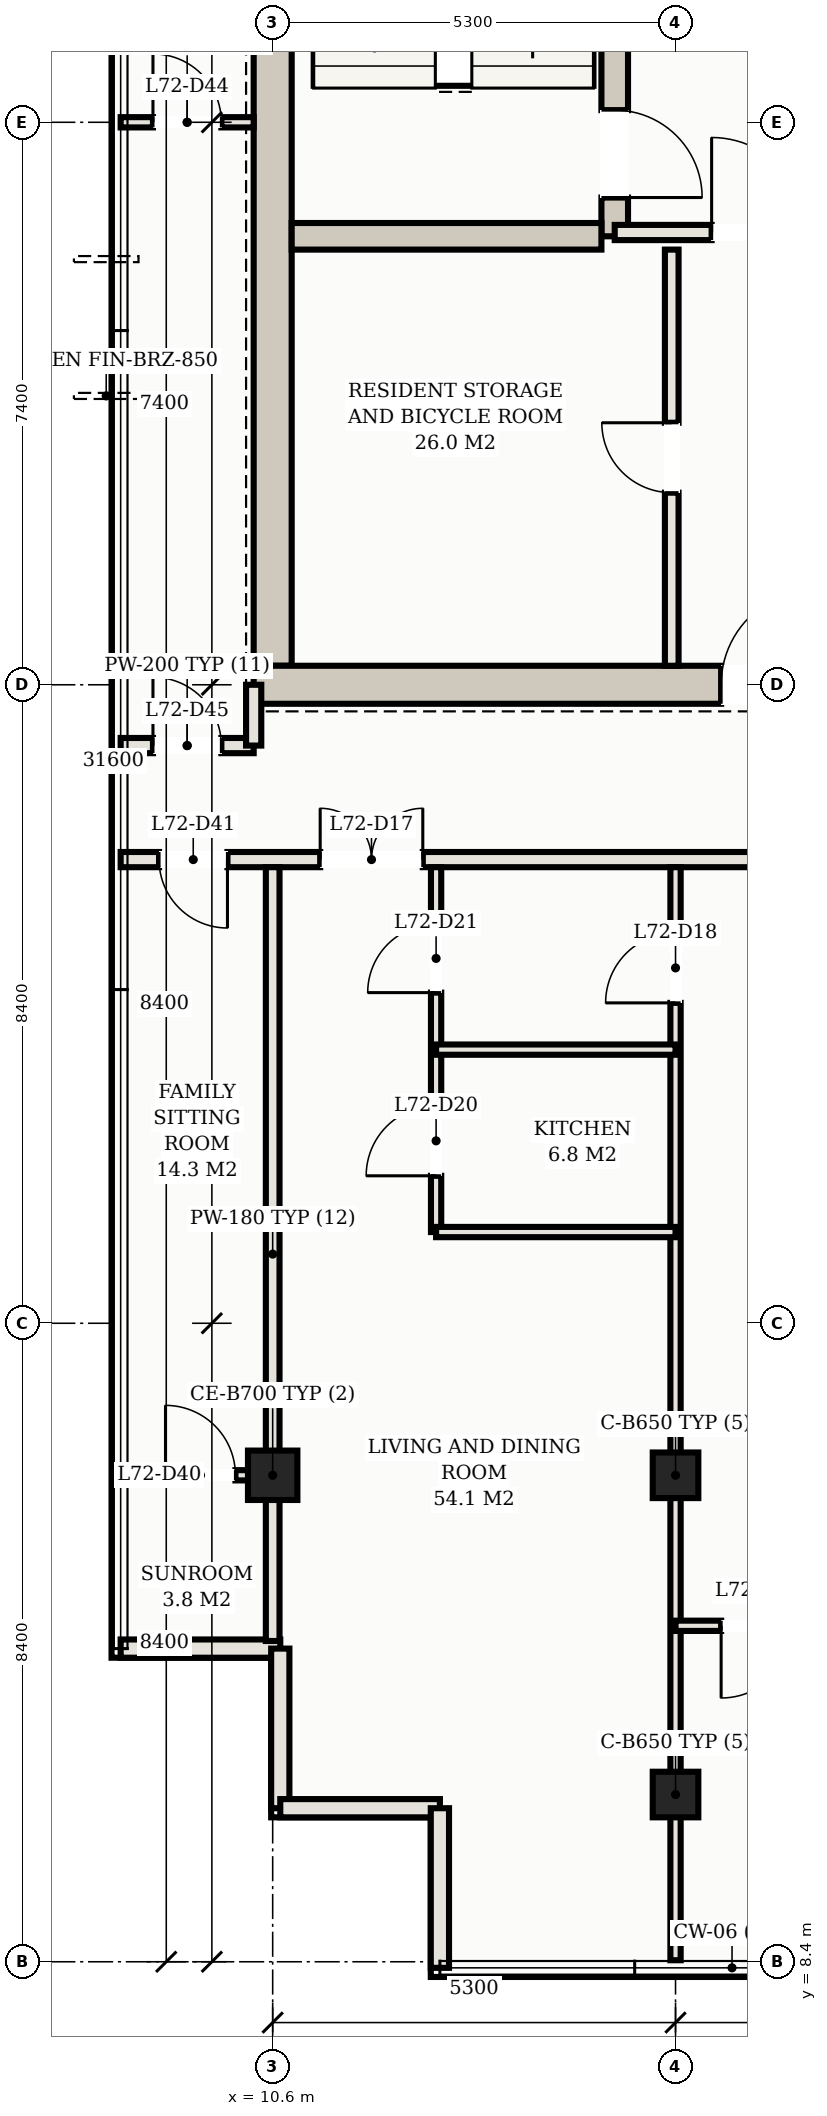
"""IFC4 building model, lengths in metres.
Left out: names, types, materials, properties, quantities, classifications, styles, units other than length and angle.
Written with IfcOpenShell. Run it as: python <this file> out.ifc"""

import sys

from ifc_helpers import new_model, si_unit, direction, frame, frame_2d, origin, origin_2d, place, context, subcontext, project, spatial, rectangle, hollow_rectangle, extrude, element, fill, save


model = new_model("IFC4")
c1 = context("Model", 3, precision=1e-05, world=origin(), true_north=direction((0.0, 1.0)))
c2 = subcontext(c1, "Body", "Model", "MODEL_VIEW")
j1 = project(units=[si_unit("LENGTHUNIT", "METRE"), si_unit("PLANEANGLEUNIT", "RADIAN")], contexts=[c1])
p1 = place(None, origin())
s1 = spatial("IfcSite", under=j1, at=p1, CompositionType="ELEMENT")
p2 = place(p1, origin())
s2 = spatial("IfcBuilding", under=s1, at=p2, CompositionType="ELEMENT")
p3 = place(p2, frame((0.0, 0.0, 259.4)))
s3 = spatial("IfcBuildingStorey", under=s2, at=p3, CompositionType="ELEMENT", Elevation=259.4)
p4 = place(p3, frame((10.6, 25.45, 0.0), z_axis=(0.0, 0.0, 1.0), x_axis=(0.0, 1.0, 0.0)))
e1 = element("IfcWall", 1, at=p4, inside=s3, PredefinedType="SHEAR", context=c2, shape_type="SweptSolid", body=[
    extrude(rectangle(XDim=14.3, YDim=0.5, at=frame_2d((7.15, 0.0))), origin(), (0.0, 0.0, 1.0), 3.11),
])
p5 = place(p3, frame((10.35, 25.2, 0.0), z_axis=(0.0, 0.0, 1.0), x_axis=(1.0, 0.0, 0.0)))
e2 = element("IfcWall", 2, at=p5, inside=s3, PredefinedType="SHEAR", context=c2, shape_type="SweptSolid", body=[
    extrude(rectangle(XDim=8.05, YDim=0.5, at=frame_2d((4.025, 0.0))), origin(), (0.0, 0.0, 1.0), 3.11),
])
p6 = place(p5, frame((6.15, 0.0, 0.0)))
e3 = element("IfcOpeningElement", 3, at=p6, cuts=e2, PredefinedType="OPENING", context=c2, shape_type="SweptSolid", body=[
    extrude(rectangle(XDim=1.25, YDim=2.2, at=frame_2d((0.625, 1.1))), frame((0.0, 0.26, 0.0), z_axis=(0.0, -1.0, 0.0), x_axis=(1.0, 0.0, 0.0)), (0.0, 0.0, 1.0), 0.52),
])
p7 = place(p3, frame((15.1, 31.1, 0.0), z_axis=(0.0, 0.0, 1.0), x_axis=(0.0, 1.0, 0.0)))
e4 = element("IfcWall", 4, at=p7, inside=s3, PredefinedType="SHEAR", context=c2, shape_type="SweptSolid", body=[
    extrude(rectangle(XDim=8.65, YDim=0.35, at=frame_2d((4.325, 0.0))), origin(), (0.0, 0.0, 1.0), 3.11),
])
p8 = place(p7, frame((0.51, 0.0, 0.0)))
e5 = element("IfcOpeningElement", 5, at=p8, cuts=e4, PredefinedType="OPENING", context=c2, shape_type="SweptSolid", body=[
    extrude(rectangle(XDim=1.15, YDim=2.2, at=frame_2d((0.575, 1.1))), frame((0.0, 0.185, 0.0), z_axis=(0.0, -1.0, 0.0), x_axis=(1.0, 0.0, 0.0)), (0.0, 0.0, 1.0), 0.37),
])
p9 = place(p3, frame((10.85, 31.1, 0.0), z_axis=(0.0, 0.0, 1.0), x_axis=(1.0, 0.0, 0.0)))
e6 = element("IfcWall", 6, at=p9, inside=s3, PredefinedType="SHEAR", context=c2, shape_type="SweptSolid", body=[
    extrude(rectangle(XDim=4.075, YDim=0.35, at=frame_2d((2.038, 0.0))), origin(), (0.0, 0.0, 1.0), 3.11),
])
for number, where, z_axis, x_axis in (
    (7, (15.9, 14.8, 0.0), (0.0, 0.0, 1.0), (1.0, 0.0, 0.0)),
    (8, (15.9, 10.6, 0.0), (0.0, 0.0, 1.0), (1.0, 0.0, 0.0)),
):
    element("IfcColumn", number, at=place(p3, frame(where, z_axis=z_axis, x_axis=x_axis)), inside=s3, PredefinedType="COLUMN", context=c2, shape_type="SweptSolid", body=[
        extrude(hollow_rectangle(XDim=0.6, YDim=0.6, WallThickness=0.022, at=origin_2d()), origin(), (0.0, 0.0, 1.0), 3.3),
    ])
p10 = place(p3, frame((10.6, 14.8, 0.0), z_axis=(0.0, 0.0, 1.0), x_axis=(1.0, 0.0, 0.0)))
e9 = element("IfcColumn", 9, at=p10, inside=s3, PredefinedType="COLUMN", context=c2, shape_type="SweptSolid", body=[
    extrude(hollow_rectangle(XDim=0.65, YDim=0.65, WallThickness=0.022, at=origin_2d()), origin(), (0.0, 0.0, 1.0), 3.3),
])
p11 = place(p3, frame((8.6, 12.52, 0.0), z_axis=(0.0, 0.0, 1.0), x_axis=(1.0, 0.0, 0.0)))
e10 = element("IfcWall", 10, at=p11, inside=s3, PredefinedType="SOLIDWALL", context=c2, shape_type="SweptSolid", body=[
    extrude(rectangle(XDim=2.1, YDim=0.24, at=frame_2d((1.05, 0.0))), origin(), (0.0, 0.0, 1.0), 3.11),
])
for number, where, z_axis, x_axis in (
    (11, (10.7, 12.52, 0.0), (0.0, 0.0, 1.0), (0.0, -1.0, 0.0)),
    (12, (10.7, 10.42, 0.0), (0.0, 0.0, 1.0), (1.0, 0.0, 0.0)),
):
    element("IfcWall", number, at=place(p3, frame(where, z_axis=z_axis, x_axis=x_axis)), inside=s3, PredefinedType="SOLIDWALL", context=c2, shape_type="SweptSolid", body=[
        extrude(rectangle(XDim=2.1, YDim=0.24, at=frame_2d((1.05, 0.0))), origin(), (0.0, 0.0, 1.0), 3.11),
    ])
p12 = place(p3, frame((12.8, 10.42, 0.0), z_axis=(0.0, 0.0, 1.0), x_axis=(0.0, -1.0, 0.0)))
e13 = element("IfcWall", 13, at=p12, inside=s3, PredefinedType="SOLIDWALL", context=c2, shape_type="SweptSolid", body=[
    extrude(rectangle(XDim=2.1, YDim=0.24, at=frame_2d((1.05, 0.0))), origin(), (0.0, 0.0, 1.0), 3.11),
])
p13 = place(p3, frame((15.1, 31.15, 0.0), z_axis=(0.0, 0.0, 1.0), x_axis=(1.0, 0.0, 0.0)))
e14 = element("IfcWall", 14, at=p13, inside=s3, PredefinedType="PARTITIONING", context=c2, shape_type="SweptSolid", body=[
    extrude(rectangle(XDim=3.25, YDim=0.2, at=frame_2d((1.625, 0.0))), origin(), (0.0, 0.0, 1.0), 2.45),
])
p14 = place(p13, frame((1.275, 0.0, 0.0)))
e15 = element("IfcOpeningElement", 15, at=p14, cuts=e14, PredefinedType="OPENING", context=c2, shape_type="SweptSolid", body=[
    extrude(rectangle(XDim=1.25, YDim=2.2, at=frame_2d((0.625, 1.1))), frame((0.0, 0.11, 0.0), z_axis=(0.0, -1.0, 0.0), x_axis=(1.0, 0.0, 0.0)), (0.0, 0.0, 1.0), 0.22),
])
p15 = place(p3, frame((15.85, 25.45, 0.0), z_axis=(0.0, 0.0, 1.0), x_axis=(0.0, 1.0, 0.0)))
e16 = element("IfcWall", 16, at=p15, inside=s3, PredefinedType="PARTITIONING", context=c2, shape_type="SweptSolid", body=[
    extrude(rectangle(XDim=5.475, YDim=0.18, at=frame_2d((2.738, 0.0))), origin(), (0.0, 0.0, 1.0), 2.45),
])
p16 = place(p15, frame((2.277, 0.0, 0.0)))
e17 = element("IfcOpeningElement", 17, at=p16, cuts=e16, PredefinedType="OPENING", context=c2, shape_type="SweptSolid", body=[
    extrude(rectangle(XDim=0.92, YDim=2.15, at=frame_2d((0.46, 1.075))), frame((0.0, 0.1, 0.0), z_axis=(0.0, -1.0, 0.0), x_axis=(1.0, 0.0, 0.0)), (0.0, 0.0, 1.0), 0.2),
])
p17 = place(p3, frame((8.6, 22.9, 0.0), z_axis=(0.0, 0.0, 1.0), x_axis=(1.0, 0.0, 0.0)))
e18 = element("IfcWall", 18, at=p17, inside=s3, PredefinedType="PARTITIONING", context=c2, shape_type="SweptSolid", body=[
    extrude(rectangle(XDim=35.8, YDim=0.2, at=frame_2d((17.9, 0.0))), origin(), (0.0, 0.0, 1.0), 2.45),
])
p18 = place(p17, frame((2.625, 0.0, 0.0)))
e19 = element("IfcOpeningElement", 19, at=p18, cuts=e18, PredefinedType="OPENING", context=c2, shape_type="SweptSolid", body=[
    extrude(rectangle(XDim=1.35, YDim=2.33, at=frame_2d((0.675, 1.165))), frame((0.0, 0.11, 0.0), z_axis=(0.0, -1.0, 0.0), x_axis=(1.0, 0.0, 0.0)), (0.0, 0.0, 1.0), 0.22),
])
p19 = place(p17, frame((18.65, 0.0, 0.0)))
e20 = element("IfcOpeningElement", 20, at=p19, cuts=e18, PredefinedType="OPENING", context=c2, shape_type="SweptSolid", body=[
    extrude(rectangle(XDim=1.1, YDim=2.25, at=frame_2d((0.55, 1.125))), frame((0.0, 0.11, 0.0), z_axis=(0.0, -1.0, 0.0), x_axis=(1.0, 0.0, 0.0)), (0.0, 0.0, 1.0), 0.22),
])
p20 = place(p17, frame((29.25, 0.0, 0.0)))
e21 = element("IfcOpeningElement", 21, at=p20, cuts=e18, PredefinedType="OPENING", context=c2, shape_type="SweptSolid", body=[
    extrude(rectangle(XDim=1.1, YDim=2.25, at=frame_2d((0.55, 1.125))), frame((0.0, 0.11, 0.0), z_axis=(0.0, -1.0, 0.0), x_axis=(1.0, 0.0, 0.0)), (0.0, 0.0, 1.0), 0.22),
])
p21 = place(p17, frame((0.505, 0.0, 0.0)))
e22 = element("IfcOpeningElement", 22, at=p21, cuts=e18, PredefinedType="OPENING", context=c2, shape_type="SweptSolid", body=[
    extrude(rectangle(XDim=0.9, YDim=2.15, at=frame_2d((0.45, 1.075))), frame((0.0, 0.11, 0.0), z_axis=(0.0, -1.0, 0.0), x_axis=(1.0, 0.0, 0.0)), (0.0, 0.0, 1.0), 0.22),
])
p22 = place(p17, frame((34.395, 0.0, 0.0)))
e23 = element("IfcOpeningElement", 23, at=p22, cuts=e18, PredefinedType="OPENING", context=c2, shape_type="SweptSolid", body=[
    extrude(rectangle(XDim=0.9, YDim=2.15, at=frame_2d((0.45, 1.075))), frame((0.0, 0.11, 0.0), z_axis=(0.0, -1.0, 0.0), x_axis=(1.0, 0.0, 0.0)), (0.0, 0.0, 1.0), 0.22),
])
p23 = place(p3, frame((8.6, 24.4, 0.0), z_axis=(0.0, 0.0, 1.0), x_axis=(1.0, 0.0, 0.0)))
e24 = element("IfcWall", 24, at=p23, inside=s3, PredefinedType="PARTITIONING", context=c2, shape_type="SweptSolid", body=[
    extrude(rectangle(XDim=1.75, YDim=0.2, at=frame_2d((0.875, 0.0))), origin(), (0.0, 0.0, 1.0), 2.45),
])
p24 = place(p23, frame((0.425, 0.0, 0.0)))
e25 = element("IfcOpeningElement", 25, at=p24, cuts=e24, PredefinedType="OPENING", context=c2, shape_type="SweptSolid", body=[
    extrude(rectangle(XDim=0.9, YDim=2.15, at=frame_2d((0.45, 1.075))), frame((0.0, 0.11, 0.0), z_axis=(0.0, -1.0, 0.0), x_axis=(1.0, 0.0, 0.0)), (0.0, 0.0, 1.0), 0.22),
])
p25 = place(p3, frame((10.35, 24.4, 0.0), z_axis=(0.0, 0.0, 1.0), x_axis=(0.0, 1.0, 0.0)))
e26 = element("IfcWall", 26, at=p25, inside=s3, PredefinedType="PARTITIONING", context=c2, shape_type="SweptSolid", body=[
    extrude(rectangle(XDim=0.8, YDim=0.2, at=frame_2d((0.4, 0.0))), origin(), (0.0, 0.0, 1.0), 2.45),
])
p26 = place(p3, frame((10.6, 12.62, 0.0), z_axis=(0.0, 0.0, 1.0), x_axis=(0.0, 1.0, 0.0)))
e27 = element("IfcWall", 27, at=p26, inside=s3, PredefinedType="PARTITIONING", context=c2, shape_type="SweptSolid", body=[
    extrude(rectangle(XDim=10.18, YDim=0.18, at=frame_2d((5.09, 0.0))), origin(), (0.0, 0.0, 1.0), 2.45),
])
p27 = place(p3, frame((15.9, 8.42, 0.0), z_axis=(0.0, 0.0, 1.0), x_axis=(0.0, 1.0, 0.0)))
e28 = element("IfcWall", 28, at=p27, inside=s3, PredefinedType="PARTITIONING", context=c2, shape_type="SweptSolid", body=[
    extrude(rectangle(XDim=14.38, YDim=0.135, at=frame_2d((7.19, 0.0))), origin(), (0.0, 0.0, 1.0), 2.45),
])
p28 = place(p27, frame((12.595, 0.0, 0.0)))
e29 = element("IfcOpeningElement", 29, at=p28, cuts=e28, PredefinedType="OPENING", context=c2, shape_type="SweptSolid", body=[
    extrude(rectangle(XDim=0.92, YDim=2.15, at=frame_2d((0.46, 1.075))), frame((0.0, 0.078, 0.0), z_axis=(0.0, -1.0, 0.0), x_axis=(1.0, 0.0, 0.0)), (0.0, 0.0, 1.0), 0.155),
])
p29 = place(p3, frame((12.75, 18.0, 0.0), z_axis=(0.0, 0.0, 1.0), x_axis=(0.0, 1.0, 0.0)))
e30 = element("IfcWall", 30, at=p29, inside=s3, PredefinedType="PARTITIONING", context=c2, shape_type="SweptSolid", body=[
    extrude(rectangle(XDim=4.8, YDim=0.135, at=frame_2d((2.4, 0.0))), origin(), (0.0, 0.0, 1.0), 2.45),
])
p30 = place(p29, frame((0.74, 0.0, 0.0)))
e31 = element("IfcOpeningElement", 31, at=p30, cuts=e30, PredefinedType="OPENING", context=c2, shape_type="SweptSolid", body=[
    extrude(rectangle(XDim=0.92, YDim=2.15, at=frame_2d((0.46, 1.075))), frame((0.0, 0.078, 0.0), z_axis=(0.0, -1.0, 0.0), x_axis=(1.0, 0.0, 0.0)), (0.0, 0.0, 1.0), 0.155),
])
p31 = place(p29, frame((3.15, 0.0, 0.0)))
e32 = element("IfcOpeningElement", 32, at=p31, cuts=e30, PredefinedType="OPENING", context=c2, shape_type="SweptSolid", body=[
    extrude(rectangle(XDim=0.9, YDim=2.15, at=frame_2d((0.45, 1.075))), frame((0.0, 0.078, 0.0), z_axis=(0.0, -1.0, 0.0), x_axis=(1.0, 0.0, 0.0)), (0.0, 0.0, 1.0), 0.155),
])
for number, where, z_axis, x_axis in (
    (33, (12.75, 18.0, 0.0), (0.0, 0.0, 1.0), (1.0, 0.0, 0.0)),
    (34, (12.75, 20.4, 0.0), (0.0, 0.0, 1.0), (1.0, 0.0, 0.0)),
):
    element("IfcWall", number, at=place(p3, frame(where, z_axis=z_axis, x_axis=x_axis)), inside=s3, PredefinedType="PARTITIONING", context=c2, shape_type="SweptSolid", body=[
        extrude(rectangle(XDim=3.15, YDim=0.135, at=frame_2d((1.575, 0.0))), origin(), (0.0, 0.0, 1.0), 2.45),
    ])
p32 = place(p3, frame((15.9, 12.82, 0.0), z_axis=(0.0, 0.0, 1.0), x_axis=(1.0, 0.0, 0.0)))
e35 = element("IfcWall", 35, at=p32, inside=s3, PredefinedType="PARTITIONING", context=c2, shape_type="SweptSolid", body=[
    extrude(rectangle(XDim=5.3, YDim=0.135, at=frame_2d((2.65, 0.0))), origin(), (0.0, 0.0, 1.0), 2.45),
])
p33 = place(p32, frame((0.6, 0.0, 0.0)))
e36 = element("IfcOpeningElement", 36, at=p33, cuts=e35, PredefinedType="OPENING", context=c2, shape_type="SweptSolid", body=[
    extrude(rectangle(XDim=0.95, YDim=2.15, at=frame_2d((0.475, 1.075))), frame((0.0, 0.078, 0.0), z_axis=(0.0, -1.0, 0.0), x_axis=(1.0, 0.0, 0.0)), (0.0, 0.0, 1.0), 0.155),
])
p34 = place(p32, frame((3.275, 0.0, 0.0)))
e37 = element("IfcOpeningElement", 37, at=p34, cuts=e35, PredefinedType="OPENING", context=c2, shape_type="SweptSolid", body=[
    extrude(rectangle(XDim=0.9, YDim=2.15, at=frame_2d((0.45, 1.075))), frame((0.0, 0.078, 0.0), z_axis=(0.0, -1.0, 0.0), x_axis=(1.0, 0.0, 0.0)), (0.0, 0.0, 1.0), 0.155),
])
p35 = place(p3, frame((8.7, 14.8, 0.0), z_axis=(0.0, 0.0, 1.0), x_axis=(1.0, 0.0, 0.0)))
e38 = element("IfcWall", 38, at=p35, inside=s3, PredefinedType="PARTITIONING", context=c2, shape_type="SweptSolid", body=[
    extrude(rectangle(XDim=1.9, YDim=0.135, at=frame_2d((0.95, 0.0))), origin(), (0.0, 0.0, 1.0), 2.45),
])
p36 = place(p35, frame((0.49, 0.0, 0.0)))
e39 = element("IfcOpeningElement", 39, at=p36, cuts=e38, PredefinedType="OPENING", context=c2, shape_type="SweptSolid", body=[
    extrude(rectangle(XDim=0.92, YDim=2.15, at=frame_2d((0.46, 1.075))), frame((0.0, 0.078, 0.0), z_axis=(0.0, -1.0, 0.0), x_axis=(1.0, 0.0, 0.0)), (0.0, 0.0, 1.0), 0.155),
])
p37 = place(p3, frame((8.6, 32.6, 0.0), z_axis=(0.0, 0.0, 1.0), x_axis=(1.0, 0.0, 0.0)))
e40 = element("IfcWall", 40, at=p37, inside=s3, PredefinedType="PARTITIONING", context=c2, shape_type="SweptSolid", body=[
    extrude(rectangle(XDim=1.75, YDim=0.135, at=frame_2d((0.875, 0.0))), origin(), (0.0, 0.0, 1.0), 2.45),
])
p38 = place(p37, frame((0.425, 0.0, 0.0)))
e41 = element("IfcOpeningElement", 41, at=p38, cuts=e40, PredefinedType="OPENING", context=c2, shape_type="SweptSolid", body=[
    extrude(rectangle(XDim=0.9, YDim=2.15, at=frame_2d((0.45, 1.075))), frame((0.0, 0.078, 0.0), z_axis=(0.0, -1.0, 0.0), x_axis=(1.0, 0.0, 0.0)), (0.0, 0.0, 1.0), 0.155),
])
p39 = place(p6, origin())
e42 = element("IfcDoor", 42, at=p39, inside=s3, OperationType="SINGLE_SWING_RIGHT", PredefinedType="DOOR", context=c2, shape_type="SweptSolid", body=[
    extrude(rectangle(XDim=1.25, YDim=2.2, at=frame_2d((0.625, 1.1))), frame((0.0, 0.025, 0.0), z_axis=(0.0, -1.0, 0.0), x_axis=(1.0, 0.0, 0.0)), (0.0, 0.0, 1.0), 0.05),
])
fill(e3, e42)
p40 = place(p14, origin())
e43 = element("IfcDoor", 43, at=p40, inside=s3, OperationType="SINGLE_SWING_LEFT", PredefinedType="DOOR", context=c2, shape_type="SweptSolid", body=[
    extrude(rectangle(XDim=1.25, YDim=2.2, at=frame_2d((0.625, 1.1))), frame((0.0, 0.025, 0.0), z_axis=(0.0, -1.0, 0.0), x_axis=(1.0, 0.0, 0.0)), (0.0, 0.0, 1.0), 0.05),
])
fill(e15, e43)
p41 = place(p8, frame((1.15, 0.0, 0.0), z_axis=(0.0, 0.0, 1.0), x_axis=(-1.0, 0.0, 0.0)))
e44 = element("IfcDoor", 44, at=p41, inside=s3, OperationType="SINGLE_SWING_RIGHT", PredefinedType="DOOR", context=c2, shape_type="SweptSolid", body=[
    extrude(rectangle(XDim=1.15, YDim=2.2, at=frame_2d((0.575, 1.1))), frame((0.0, 0.025, 0.0), z_axis=(0.0, -1.0, 0.0), x_axis=(1.0, 0.0, 0.0)), (0.0, 0.0, 1.0), 0.05),
])
fill(e5, e44)
p42 = place(p16, origin())
e45 = element("IfcDoor", 45, at=p42, inside=s3, OperationType="SINGLE_SWING_RIGHT", PredefinedType="DOOR", context=c2, shape_type="SweptSolid", body=[
    extrude(rectangle(XDim=0.92, YDim=2.15, at=frame_2d((0.46, 1.075))), frame((0.0, 0.025, 0.0), z_axis=(0.0, -1.0, 0.0), x_axis=(1.0, 0.0, 0.0)), (0.0, 0.0, 1.0), 0.05),
])
fill(e17, e45)
p43 = place(p18, origin())
e46 = element("IfcDoor", 46, at=p43, inside=s3, OperationType="DOUBLE_DOOR_SINGLE_SWING", PredefinedType="DOOR", context=c2, shape_type="SweptSolid", body=[
    extrude(rectangle(XDim=1.35, YDim=2.33, at=frame_2d((0.675, 1.165))), frame((0.0, 0.025, 0.0), z_axis=(0.0, -1.0, 0.0), x_axis=(1.0, 0.0, 0.0)), (0.0, 0.0, 1.0), 0.05),
])
fill(e19, e46)
p44 = place(p28, origin())
e47 = element("IfcDoor", 47, at=p44, inside=s3, OperationType="SINGLE_SWING_LEFT", PredefinedType="DOOR", context=c2, shape_type="SweptSolid", body=[
    extrude(rectangle(XDim=0.92, YDim=2.15, at=frame_2d((0.46, 1.075))), frame((0.0, 0.025, 0.0), z_axis=(0.0, -1.0, 0.0), x_axis=(1.0, 0.0, 0.0)), (0.0, 0.0, 1.0), 0.05),
])
fill(e29, e47)
p45 = place(p30, origin())
e48 = element("IfcDoor", 48, at=p45, inside=s3, OperationType="SINGLE_SWING_LEFT", PredefinedType="DOOR", context=c2, shape_type="SweptSolid", body=[
    extrude(rectangle(XDim=0.92, YDim=2.15, at=frame_2d((0.46, 1.075))), frame((0.0, 0.025, 0.0), z_axis=(0.0, -1.0, 0.0), x_axis=(1.0, 0.0, 0.0)), (0.0, 0.0, 1.0), 0.05),
])
fill(e31, e48)
p46 = place(p31, origin())
e49 = element("IfcDoor", 49, at=p46, inside=s3, OperationType="SINGLE_SWING_LEFT", PredefinedType="DOOR", context=c2, shape_type="SweptSolid", body=[
    extrude(rectangle(XDim=0.9, YDim=2.15, at=frame_2d((0.45, 1.075))), frame((0.0, 0.025, 0.0), z_axis=(0.0, -1.0, 0.0), x_axis=(1.0, 0.0, 0.0)), (0.0, 0.0, 1.0), 0.05),
])
fill(e32, e49)
p47 = place(p33, frame((0.95, 0.0, 0.0), z_axis=(0.0, 0.0, 1.0), x_axis=(-1.0, 0.0, 0.0)))
e50 = element("IfcDoor", 50, at=p47, inside=s3, OperationType="SINGLE_SWING_RIGHT", PredefinedType="DOOR", context=c2, shape_type="SweptSolid", body=[
    extrude(rectangle(XDim=0.95, YDim=2.15, at=frame_2d((0.475, 1.075))), frame((0.0, 0.025, 0.0), z_axis=(0.0, -1.0, 0.0), x_axis=(1.0, 0.0, 0.0)), (0.0, 0.0, 1.0), 0.05),
])
fill(e36, e50)
p48 = place(p36, origin())
e51 = element("IfcDoor", 51, at=p48, inside=s3, OperationType="SINGLE_SWING_LEFT", PredefinedType="DOOR", context=c2, shape_type="SweptSolid", body=[
    extrude(rectangle(XDim=0.92, YDim=2.15, at=frame_2d((0.46, 1.075))), frame((0.0, 0.025, 0.0), z_axis=(0.0, -1.0, 0.0), x_axis=(1.0, 0.0, 0.0)), (0.0, 0.0, 1.0), 0.05),
])
fill(e39, e51)
p49 = place(p21, frame((0.9, 0.0, 0.0), z_axis=(0.0, 0.0, 1.0), x_axis=(-1.0, 0.0, 0.0)))
e52 = element("IfcDoor", 52, at=p49, inside=s3, OperationType="SINGLE_SWING_LEFT", PredefinedType="DOOR", context=c2, shape_type="SweptSolid", body=[
    extrude(rectangle(XDim=0.9, YDim=2.15, at=frame_2d((0.45, 1.075))), frame((0.0, 0.025, 0.0), z_axis=(0.0, -1.0, 0.0), x_axis=(1.0, 0.0, 0.0)), (0.0, 0.0, 1.0), 0.05),
])
fill(e22, e52)
p50 = place(p38, origin())
e53 = element("IfcDoor", 53, at=p50, inside=s3, OperationType="SINGLE_SWING_LEFT", PredefinedType="DOOR", context=c2, shape_type="SweptSolid", body=[
    extrude(rectangle(XDim=0.9, YDim=2.15, at=frame_2d((0.45, 1.075))), frame((0.0, 0.025, 0.0), z_axis=(0.0, -1.0, 0.0), x_axis=(1.0, 0.0, 0.0)), (0.0, 0.0, 1.0), 0.05),
])
fill(e41, e53)
p51 = place(p24, origin())
e54 = element("IfcDoor", 54, at=p51, inside=s3, OperationType="SINGLE_SWING_LEFT", PredefinedType="DOOR", context=c2, shape_type="SweptSolid", body=[
    extrude(rectangle(XDim=0.9, YDim=2.15, at=frame_2d((0.45, 1.075))), frame((0.0, 0.025, 0.0), z_axis=(0.0, -1.0, 0.0), x_axis=(1.0, 0.0, 0.0)), (0.0, 0.0, 1.0), 0.05),
])
fill(e25, e54)
save(model, sys.argv[1])
